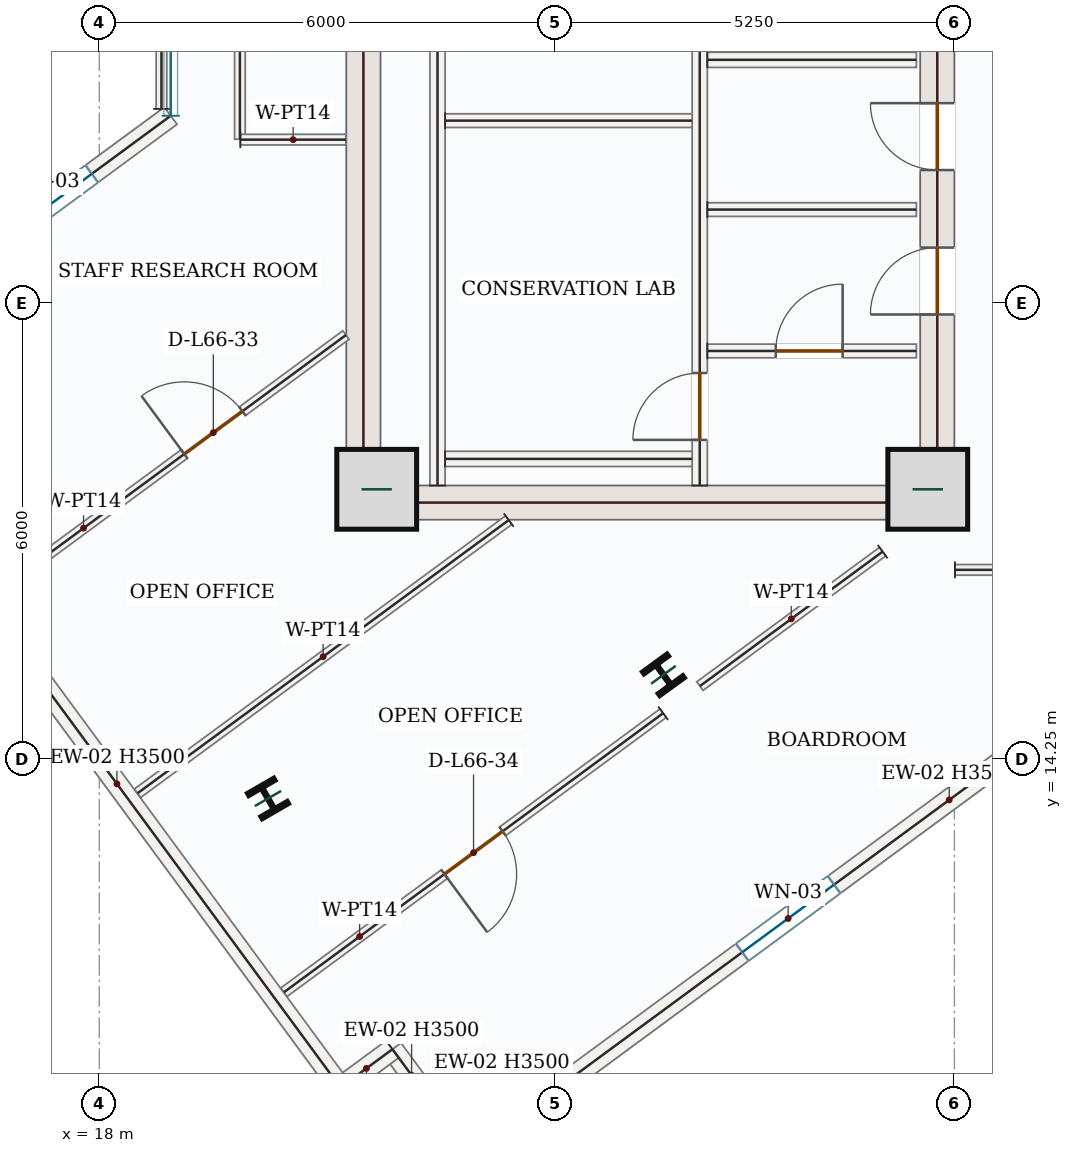
"""IFC4 building model, lengths in metres.
Left out: names, types, materials, properties, quantities, classifications, styles, units other than length and angle.
Written with IfcOpenShell. Run it as: python <this file> out.ifc"""

import sys

from ifc_helpers import new_model, si_unit, direction, frame, frame_2d, origin, origin_2d, place, context, subcontext, project, spatial, rectangle, i_section, extrude, source, transform, mapped, element, fill, save


model = new_model("IFC4")
c1 = context("Model", 3, precision=1e-05, world=origin(), true_north=direction((0.0, 1.0)))
c2 = subcontext(c1, "Body", "Model", "MODEL_VIEW")
j1 = project(units=[si_unit("LENGTHUNIT", "METRE"), si_unit("PLANEANGLEUNIT", "RADIAN")], contexts=[c1])
p1 = place(None, origin())
s1 = spatial("IfcSite", under=j1, at=p1, CompositionType="ELEMENT")
p2 = place(p1, origin())
s2 = spatial("IfcBuilding", under=s1, at=p2, CompositionType="ELEMENT")
p3 = place(p2, frame((0.0, 0.0, 276.6)))
s3 = spatial("IfcBuildingStorey", under=s2, at=p3, CompositionType="ELEMENT", Elevation=276.6)
m1 = source(origin(), c2, "Body", "SweptSolid", [
    extrude(rectangle(XDim=8.55, YDim=0.45, at=frame_2d((4.275, 0.0))), origin(), (0.0, 0.0, 1.0), 3.5),
])
p4 = place(p3, frame((21.475, 17.4, 0.0), z_axis=(0.0, 0.0, 1.0), x_axis=(0.0, 1.0, 0.0)))
e1 = element("IfcWall", 1, at=p4, inside=s3, PredefinedType="SHEAR", context=c2, shape_type="MappedRepresentation", body=[
    mapped(m1, transform((0.0, 0.0, 0.0), x_axis=(1.0, 0.0, 0.0), y_axis=(0.0, 1.0, 0.0), z_axis=(0.0, 0.0, 1.0), scale=1.0)),
])
p5 = place(p3, frame((29.025, 17.4, 0.0), z_axis=(0.0, 0.0, 1.0), x_axis=(0.0, 1.0, 0.0)))
e2 = element("IfcWall", 2, at=p5, inside=s3, PredefinedType="SHEAR", context=c2, shape_type="SweptSolid", body=[
    extrude(rectangle(XDim=8.55, YDim=0.45, at=frame_2d((4.275, 0.0))), origin(), (0.0, 0.0, 1.0), 3.5),
])
p6 = place(p5, frame((6.65, 0.0, 0.0)))
e3 = element("IfcOpeningElement", 3, at=p6, cuts=e2, PredefinedType="OPENING", context=c2, shape_type="SweptSolid", body=[
    extrude(rectangle(XDim=1.1, YDim=2.2, at=frame_2d((0.55, 1.1))), frame((0.0, 0.235, 0.0), z_axis=(0.0, -1.0, 0.0), x_axis=(1.0, 0.0, 0.0)), (0.0, 0.0, 1.0), 0.47),
])
p7 = place(p5, frame((2.7, 0.0, 0.0)))
e4 = element("IfcOpeningElement", 4, at=p7, cuts=e2, PredefinedType="OPENING", context=c2, shape_type="SweptSolid", body=[
    extrude(rectangle(XDim=0.88, YDim=2.1, at=frame_2d((0.44, 1.05))), frame((0.0, 0.235, 0.0), z_axis=(0.0, -1.0, 0.0), x_axis=(1.0, 0.0, 0.0)), (0.0, 0.0, 1.0), 0.47),
])
p8 = place(p5, frame((4.6, 0.0, 0.0)))
e5 = element("IfcOpeningElement", 5, at=p8, cuts=e2, PredefinedType="OPENING", context=c2, shape_type="SweptSolid", body=[
    extrude(rectangle(XDim=0.88, YDim=2.1, at=frame_2d((0.44, 1.05))), frame((0.0, 0.235, 0.0), z_axis=(0.0, -1.0, 0.0), x_axis=(1.0, 0.0, 0.0)), (0.0, 0.0, 1.0), 0.47),
])
m2 = source(origin(), c2, "Body", "SweptSolid", [
    extrude(rectangle(XDim=7.1, YDim=0.45, at=frame_2d((3.55, 0.0))), origin(), (0.0, 0.0, 1.0), 3.5),
])
p9 = place(p3, frame((21.7, 17.625, 0.0), z_axis=(0.0, 0.0, 1.0), x_axis=(1.0, 0.0, 0.0)))
e6 = element("IfcWall", 6, at=p9, inside=s3, PredefinedType="SHEAR", context=c2, shape_type="MappedRepresentation", body=[
    mapped(m2, transform((0.0, 0.0, 0.0), x_axis=(1.0, 0.0, 0.0), y_axis=(0.0, 1.0, 0.0), z_axis=(0.0, 0.0, 1.0), scale=1.0)),
])
m3 = source(origin(), c2, "Body", "SweptSolid", [
    extrude(rectangle(XDim=1.05, YDim=1.05, at=origin_2d()), origin(), (0.0, 0.0, 1.0), 3.75),
])
for number, where, z_axis, x_axis in (
    (7, (21.65, 17.8, 0.0), (0.0, 0.0, 1.0), (1.0, 0.0, 0.0)),
    (8, (28.9, 17.8, 0.0), (0.0, 0.0, 1.0), (1.0, 0.0, 0.0)),
):
    element("IfcColumn", number, at=place(p3, frame(where, z_axis=z_axis, x_axis=x_axis)), inside=s3, PredefinedType="COLUMN", context=c2, shape_type="MappedRepresentation", body=[
        mapped(m3, transform((0.0, 0.0, 0.0), x_axis=(1.0, 0.0, 0.0), y_axis=(0.0, 1.0, 0.0), z_axis=(0.0, 0.0, 1.0), scale=1.0)),
    ])
m4 = source(origin(), c2, "Body", "SweptSolid", [
    extrude(i_section(OverallWidth=0.399, OverallDepth=0.386, WebThickness=0.021, FlangeThickness=0.033, FilletRadius=0.018, at=origin_2d()), origin(), (0.0, 0.0, 1.0), 3.75),
])
for number, where, z_axis, x_axis in (
    (9, (25.422, 15.359, 0.0), (0.0, 0.0, 1.0), (0.809, 0.588, 0.0)),
    (10, (20.22, 13.732, 0.0), (0.0, 0.0, 1.0), (0.866, 0.5, 0.0)),
):
    element("IfcColumn", number, at=place(p3, frame(where, z_axis=z_axis, x_axis=x_axis)), inside=s3, PredefinedType="COLUMN", context=c2, shape_type="MappedRepresentation", body=[
        mapped(m4, transform((0.0, 0.0, 0.0), x_axis=(1.0, 0.0, 0.0), y_axis=(0.0, 1.0, 0.0), z_axis=(0.0, 0.0, 1.0), scale=1.0)),
    ])
p10 = place(p3, frame((30.577, 14.74, 0.0), z_axis=(0.0, 0.0, 1.0), x_axis=(-0.805403112922, -0.592727446383, 0.0)))
e11 = element("IfcWall", 11, at=p10, inside=s3, PredefinedType="SOLIDWALL", context=c2, shape_type="SweptSolid", body=[
    extrude(rectangle(XDim=8.726, YDim=0.28, at=frame_2d((4.363, 0.0))), origin(), (0.0, 0.0, 1.0), 3.5),
])
p11 = place(p10, frame((3.613, 0.0, 0.85)))
e12 = element("IfcOpeningElement", 12, at=p11, cuts=e11, PredefinedType="OPENING", context=c2, shape_type="SweptSolid", body=[
    extrude(rectangle(XDim=1.5, YDim=1.5, at=frame_2d((0.75, 0.75))), frame((0.0, 0.15, 0.0), z_axis=(0.0, -1.0, 0.0), x_axis=(1.0, 0.0, 0.0)), (0.0, 0.0, 1.0), 0.3),
])
m5 = source(origin(), c2, "Body", "SweptSolid", [
    extrude(rectangle(XDim=0.85, YDim=0.28, at=frame_2d((0.425, 0.0))), origin(), (0.0, 0.0, 1.0), 3.5),
])
p12 = place(p3, frame((23.549, 9.568, 0.0), z_axis=(0.0, 0.0, 1.0), x_axis=(-0.592807079659, 0.80534450163, 0.0)))
e13 = element("IfcWall", 13, at=p12, inside=s3, PredefinedType="SOLIDWALL", context=c2, shape_type="MappedRepresentation", body=[
    mapped(m5, transform((0.0, 0.0, 0.0), x_axis=(1.0, 0.0, 0.0), y_axis=(0.0, 1.0, 0.0), z_axis=(0.0, 0.0, 1.0), scale=1.0)),
])
m6 = source(origin(), c2, "Body", "SweptSolid", [
    extrude(rectangle(XDim=0.85, YDim=0.28, at=frame_2d((0.425, 0.0))), origin(), (0.0, 0.0, 1.0), 3.5),
])
for number, where, z_axis, x_axis in (
    (14, (23.045, 10.253, 0.0), (0.0, 0.0, 1.0), (-0.805, -0.593, 0.0)),
    (15, (22.361, 9.749, 0.0), (0.0, 0.0, 1.0), (-0.593, 0.805, 0.0)),
):
    element("IfcWall", number, at=place(p3, frame(where, z_axis=z_axis, x_axis=x_axis)), inside=s3, PredefinedType="SOLIDWALL", context=c2, shape_type="MappedRepresentation", body=[
        mapped(m6, transform((0.0, 0.0, 0.0), x_axis=(1.0, 0.0, 0.0), y_axis=(0.0, 1.0, 0.0), z_axis=(0.0, 0.0, 1.0), scale=1.0)),
    ])
p13 = place(p3, frame((21.857, 10.434, 0.0), z_axis=(0.0, 0.0, 1.0), x_axis=(-0.80534450163, -0.592807079659, 0.0)))
e16 = element("IfcWall", 16, at=p13, inside=s3, PredefinedType="SOLIDWALL", context=c2, shape_type="MappedRepresentation", body=[
    mapped(m5, transform((0.0, 0.0, 0.0), x_axis=(1.0, 0.0, 0.0), y_axis=(0.0, 1.0, 0.0), z_axis=(0.0, 0.0, 1.0), scale=1.0)),
])
m7 = source(origin(), c2, "Body", "SweptSolid", [
    extrude(rectangle(XDim=9.92, YDim=0.28, at=frame_2d((4.96, 0.0))), origin(), (0.0, 0.0, 1.0), 3.5),
])
p14 = place(p3, frame((21.173, 9.93, 0.0), z_axis=(0.0, 0.0, 1.0), x_axis=(-0.592722097771, 0.805407049146, 0.0)))
e17 = element("IfcWall", 17, at=p14, inside=s3, PredefinedType="SOLIDWALL", context=c2, shape_type="MappedRepresentation", body=[
    mapped(m7, transform((0.0, 0.0, 0.0), x_axis=(1.0, 0.0, 0.0), y_axis=(0.0, 1.0, 0.0), z_axis=(0.0, 0.0, 1.0), scale=1.0)),
])
p15 = place(p3, frame((15.654, 20.296, 0.0), z_axis=(0.0, 0.0, 1.0), x_axis=(0.805410687764, 0.592717153486, 0.0)))
e18 = element("IfcWall", 18, at=p15, inside=s3, PredefinedType="SOLIDWALL", context=c2, shape_type="SweptSolid", body=[
    extrude(rectangle(XDim=4.079, YDim=0.28, at=frame_2d((2.04, 0.0))), origin(), (0.0, 0.0, 1.0), 3.5),
])
p16 = place(p15, frame((1.29, 0.0, 0.85)))
e19 = element("IfcOpeningElement", 19, at=p16, cuts=e18, PredefinedType="OPENING", context=c2, shape_type="SweptSolid", body=[
    extrude(rectangle(XDim=1.5, YDim=1.5, at=frame_2d((0.75, 0.75))), frame((0.0, 0.15, 0.0), z_axis=(0.0, -1.0, 0.0), x_axis=(1.0, 0.0, 0.0)), (0.0, 0.0, 1.0), 0.3),
])
m8 = source(origin(), c2, "Body", "SweptSolid", [
    extrude(rectangle(XDim=7.87, YDim=0.2, at=frame_2d((3.935, 0.0))), origin(), (0.0, 0.0, 1.0), 3.5),
])
p17 = place(p3, frame((22.45, 17.85, 0.0), z_axis=(0.0, 0.0, 1.0), x_axis=(0.0, 1.0, 0.0)))
e20 = element("IfcWall", 20, at=p17, inside=s3, PredefinedType="SOLIDWALL", context=c2, shape_type="MappedRepresentation", body=[
    mapped(m8, transform((0.0, 0.0, 0.0), x_axis=(1.0, 0.0, 0.0), y_axis=(0.0, 1.0, 0.0), z_axis=(0.0, 0.0, 1.0), scale=1.0)),
])
p18 = place(p3, frame((25.9, 17.85, 0.0), z_axis=(0.0, 0.0, 1.0), x_axis=(0.0, 1.0, 0.0)))
e21 = element("IfcWall", 21, at=p18, inside=s3, PredefinedType="SOLIDWALL", context=c2, shape_type="SweptSolid", body=[
    extrude(rectangle(XDim=8.0, YDim=0.2, at=frame_2d((4.0, 0.0))), origin(), (0.0, 0.0, 1.0), 3.5),
])
p19 = place(p18, frame((6.2, 0.0, 0.0)))
e22 = element("IfcOpeningElement", 22, at=p19, cuts=e21, PredefinedType="OPENING", context=c2, shape_type="SweptSolid", body=[
    extrude(rectangle(XDim=1.0, YDim=2.15, at=frame_2d((0.5, 1.075))), frame((0.0, 0.11, 0.0), z_axis=(0.0, -1.0, 0.0), x_axis=(1.0, 0.0, 0.0)), (0.0, 0.0, 1.0), 0.22),
])
p20 = place(p18, frame((0.6, 0.0, 0.0)))
e23 = element("IfcOpeningElement", 23, at=p20, cuts=e21, PredefinedType="OPENING", context=c2, shape_type="SweptSolid", body=[
    extrude(rectangle(XDim=0.88, YDim=2.1, at=frame_2d((0.44, 1.05))), frame((0.0, 0.11, 0.0), z_axis=(0.0, -1.0, 0.0), x_axis=(1.0, 0.0, 0.0)), (0.0, 0.0, 1.0), 0.22),
])
m9 = source(origin(), c2, "Body", "SweptSolid", [
    extrude(rectangle(XDim=3.25, YDim=0.2, at=frame_2d((1.625, 0.0))), origin(), (0.0, 0.0, 1.0), 3.5),
])
p21 = place(p3, frame((22.55, 18.2, 0.0), z_axis=(0.0, 0.0, 1.0), x_axis=(1.0, 0.0, 0.0)))
e24 = element("IfcWall", 24, at=p21, inside=s3, PredefinedType="SOLIDWALL", context=c2, shape_type="MappedRepresentation", body=[
    mapped(m9, transform((0.0, 0.0, 0.0), x_axis=(1.0, 0.0, 0.0), y_axis=(0.0, 1.0, 0.0), z_axis=(0.0, 0.0, 1.0), scale=1.0)),
])
m10 = source(origin(), c2, "Body", "SweptSolid", [
    extrude(rectangle(XDim=3.25, YDim=0.18, at=frame_2d((1.625, 0.0))), origin(), (0.0, 0.0, 1.0), 3.5),
])
p22 = place(p3, frame((22.55, 22.65, 0.0), z_axis=(0.0, 0.0, 1.0), x_axis=(1.0, 0.0, 0.0)))
e25 = element("IfcWall", 25, at=p22, inside=s3, PredefinedType="PARTITIONING", context=c2, shape_type="MappedRepresentation", body=[
    mapped(m10, transform((0.0, 0.0, 0.0), x_axis=(1.0, 0.0, 0.0), y_axis=(0.0, 1.0, 0.0), z_axis=(0.0, 0.0, 1.0), scale=1.0)),
])
m11 = source(origin(), c2, "Body", "SweptSolid", [
    extrude(rectangle(XDim=2.75, YDim=0.2, at=frame_2d((1.375, 0.0))), origin(), (0.0, 0.0, 1.0), 3.5),
])
p23 = place(p3, frame((26.0, 23.45, 0.0), z_axis=(0.0, 0.0, 1.0), x_axis=(1.0, 0.0, 0.0)))
e26 = element("IfcWall", 26, at=p23, inside=s3, PredefinedType="SOLIDWALL", context=c2, shape_type="MappedRepresentation", body=[
    mapped(m11, transform((0.0, 0.0, 0.0), x_axis=(1.0, 0.0, 0.0), y_axis=(0.0, 1.0, 0.0), z_axis=(0.0, 0.0, 1.0), scale=1.0)),
])
p24 = place(p3, frame((26.0, 19.62, 0.0), z_axis=(0.0, 0.0, 1.0), x_axis=(1.0, 0.0, 0.0)))
e27 = element("IfcWall", 27, at=p24, inside=s3, PredefinedType="PARTITIONING", context=c2, shape_type="SweptSolid", body=[
    extrude(rectangle(XDim=2.75, YDim=0.18, at=frame_2d((1.375, 0.0))), origin(), (0.0, 0.0, 1.0), 3.5),
])
p25 = place(p24, frame((0.9, 0.0, 0.0)))
e28 = element("IfcOpeningElement", 28, at=p25, cuts=e27, PredefinedType="OPENING", context=c2, shape_type="SweptSolid", body=[
    extrude(rectangle(XDim=0.88, YDim=2.1, at=frame_2d((0.44, 1.05))), frame((0.0, 0.1, 0.0), z_axis=(0.0, -1.0, 0.0), x_axis=(1.0, 0.0, 0.0)), (0.0, 0.0, 1.0), 0.2),
])
m12 = source(origin(), c2, "Body", "SweptSolid", [
    extrude(rectangle(XDim=2.75, YDim=0.18, at=frame_2d((1.375, 0.0))), origin(), (0.0, 0.0, 1.0), 3.5),
])
p26 = place(p3, frame((26.0, 21.48, 0.0), z_axis=(0.0, 0.0, 1.0), x_axis=(1.0, 0.0, 0.0)))
e29 = element("IfcWall", 29, at=p26, inside=s3, PredefinedType="PARTITIONING", context=c2, shape_type="MappedRepresentation", body=[
    mapped(m12, transform((0.0, 0.0, 0.0), x_axis=(1.0, 0.0, 0.0), y_axis=(0.0, 1.0, 0.0), z_axis=(0.0, 0.0, 1.0), scale=1.0)),
])
m13 = source(origin(), c2, "Body", "SweptSolid", [
    extrude(rectangle(XDim=6.063, YDim=0.14, at=frame_2d((3.032, 0.0))), origin(), (0.0, 0.0, 1.0), 3.5),
])
p27 = place(p3, frame((23.387, 17.395, 0.0), z_axis=(0.0, 0.0, 1.0), x_axis=(-0.805422045282, -0.59270172007, 0.0)))
e30 = element("IfcWall", 30, at=p27, inside=s3, PredefinedType="PARTITIONING", context=c2, shape_type="MappedRepresentation", body=[
    mapped(m13, transform((0.0, 0.0, 0.0), x_axis=(1.0, 0.0, 0.0), y_axis=(0.0, 1.0, 0.0), z_axis=(0.0, 0.0, 1.0), scale=1.0)),
])
p28 = place(p3, frame((16.589, 16.403, 0.0), z_axis=(0.0, 0.0, 1.0), x_axis=(0.80540492624, 0.592724982423, 0.0)))
e31 = element("IfcWall", 31, at=p28, inside=s3, PredefinedType="PARTITIONING", context=c2, shape_type="SweptSolid", body=[
    extrude(rectangle(XDim=5.781, YDim=0.14, at=frame_2d((2.891, 0.0))), origin(), (0.0, 0.0, 1.0), 3.5),
])
p29 = place(p28, frame((3.14, 0.0, 0.0)))
e32 = element("IfcOpeningElement", 32, at=p29, cuts=e31, PredefinedType="OPENING", context=c2, shape_type="SweptSolid", body=[
    extrude(rectangle(XDim=0.95, YDim=2.15, at=frame_2d((0.475, 1.075))), frame((0.0, 0.08, 0.0), z_axis=(0.0, -1.0, 0.0), x_axis=(1.0, 0.0, 0.0)), (0.0, 0.0, 1.0), 0.16),
])
m14 = source(origin(), c2, "Body", "SweptSolid", [
    extrude(rectangle(XDim=2.985, YDim=0.14, at=frame_2d((1.492, 0.0))), origin(), (0.0, 0.0, 1.0), 3.5),
])
p30 = place(p3, frame((28.306, 16.98, 0.0), z_axis=(0.0, 0.0, 1.0), x_axis=(-0.80539491033, -0.592738591973, 0.0)))
e33 = element("IfcWall", 33, at=p30, inside=s3, PredefinedType="PARTITIONING", context=c2, shape_type="MappedRepresentation", body=[
    mapped(m14, transform((0.0, 0.0, 0.0), x_axis=(1.0, 0.0, 0.0), y_axis=(0.0, 1.0, 0.0), z_axis=(0.0, 0.0, 1.0), scale=1.0)),
])
p31 = place(p3, frame((25.418, 14.854, 0.0), z_axis=(0.0, 0.0, 1.0), x_axis=(-0.805402487917, -0.592728295645, 0.0)))
e34 = element("IfcWall", 34, at=p31, inside=s3, PredefinedType="PARTITIONING", context=c2, shape_type="SweptSolid", body=[
    extrude(rectangle(XDim=6.193, YDim=0.14, at=frame_2d((3.097, 0.0))), origin(), (0.0, 0.0, 1.0), 3.5),
])
p32 = place(p31, frame((2.622, 0.0, 0.0)))
e35 = element("IfcOpeningElement", 35, at=p32, cuts=e34, PredefinedType="OPENING", context=c2, shape_type="SweptSolid", body=[
    extrude(rectangle(XDim=0.95, YDim=2.15, at=frame_2d((0.475, 1.075))), frame((0.0, 0.08, 0.0), z_axis=(0.0, -1.0, 0.0), x_axis=(1.0, 0.0, 0.0)), (0.0, 0.0, 1.0), 0.16),
])
p33 = place(p3, frame((19.85, 29.49, 0.0), z_axis=(0.0, 0.0, 1.0), x_axis=(0.0, -1.0, 0.0)))
e36 = element("IfcWall", 36, at=p33, inside=s3, PredefinedType="PARTITIONING", context=c2, shape_type="SweptSolid", body=[
    extrude(rectangle(XDim=7.083, YDim=0.14, at=frame_2d((3.542, 0.0))), origin(), (0.0, 0.0, 1.0), 3.5),
])
p34 = place(p33, frame((1.349, 0.0, 0.0)))
e37 = element("IfcOpeningElement", 37, at=p34, cuts=e36, PredefinedType="OPENING", context=c2, shape_type="SweptSolid", body=[
    extrude(rectangle(XDim=0.95, YDim=2.15, at=frame_2d((0.475, 1.075))), frame((0.0, 0.08, 0.0), z_axis=(0.0, -1.0, 0.0), x_axis=(1.0, 0.0, 0.0)), (0.0, 0.0, 1.0), 0.16),
])
m15 = source(origin(), c2, "Body", "SweptSolid", [
    extrude(rectangle(XDim=1.389, YDim=0.14, at=frame_2d((0.695, 0.0))), origin(), (0.0, 0.0, 1.0), 3.5),
])
p35 = place(p3, frame((19.856, 22.4, 0.0), z_axis=(0.0, 0.0, 1.0), x_axis=(1.0, 0.0, 0.0)))
e38 = element("IfcWall", 38, at=p35, inside=s3, PredefinedType="PARTITIONING", context=c2, shape_type="MappedRepresentation", body=[
    mapped(m15, transform((0.0, 0.0, 0.0), x_axis=(1.0, 0.0, 0.0), y_axis=(0.0, 1.0, 0.0), z_axis=(0.0, 0.0, 1.0), scale=1.0)),
])
m16 = source(origin(), c2, "Body", "SweptSolid", [
    extrude(rectangle(XDim=6.836, YDim=0.14, at=frame_2d((3.418, 0.0))), origin(), (0.0, 0.0, 1.0), 3.5),
])
p36 = place(p3, frame((18.818, 22.805, 0.0), z_axis=(0.0, 0.0, 1.0), x_axis=(0.000285724478, 0.999999959181, 0.0)))
e39 = element("IfcWall", 39, at=p36, inside=s3, PredefinedType="PARTITIONING", context=c2, shape_type="MappedRepresentation", body=[
    mapped(m16, transform((0.0, 0.0, 0.0), x_axis=(1.0, 0.0, 0.0), y_axis=(0.0, 1.0, 0.0), z_axis=(0.0, 0.0, 1.0), scale=1.0)),
])
p37 = place(p3, frame((29.258, 16.74, 0.0), z_axis=(0.0, 0.0, 1.0), x_axis=(0.999999998895, -4.7021207e-05, 0.0)))
e40 = element("IfcWall", 40, at=p37, inside=s3, PredefinedType="PARTITIONING", context=c2, shape_type="SweptSolid", body=[
    extrude(rectangle(XDim=5.192, YDim=0.14, at=frame_2d((2.596, 0.0))), origin(), (0.0, 0.0, 1.0), 3.5),
])
p38 = place(p37, frame((3.309, 0.0, 0.0)))
e41 = element("IfcOpeningElement", 41, at=p38, cuts=e40, PredefinedType="OPENING", context=c2, shape_type="SweptSolid", body=[
    extrude(rectangle(XDim=0.95, YDim=2.15, at=frame_2d((0.475, 1.075))), frame((0.0, 0.08, 0.0), z_axis=(0.0, -1.0, 0.0), x_axis=(1.0, 0.0, 0.0)), (0.0, 0.0, 1.0), 0.16),
])
m17 = source(origin(), c2, "Body", "SweptSolid", [
    extrude(rectangle(XDim=1.5, YDim=1.5, at=frame_2d((0.75, 0.75))), frame((0.0, 0.03, 0.0), z_axis=(0.0, -1.0, 0.0), x_axis=(1.0, 0.0, 0.0)), (0.0, 0.0, 1.0), 0.06),
])
p39 = place(p11, origin())
e42 = element("IfcWindow", 42, at=p39, inside=s3, PartitioningType="SINGLE_PANEL", PredefinedType="WINDOW", context=c2, shape_type="MappedRepresentation", body=[
    mapped(m17, transform((0.0, 0.0, 0.0), x_axis=(1.0, 0.0, 0.0), y_axis=(0.0, 1.0, 0.0), z_axis=(0.0, 0.0, 1.0), scale=1.0)),
])
fill(e12, e42)
p40 = place(p16, origin())
e43 = element("IfcWindow", 43, at=p40, inside=s3, PartitioningType="SINGLE_PANEL", PredefinedType="WINDOW", context=c2, shape_type="MappedRepresentation", body=[
    mapped(m17, transform((0.0, 0.0, 0.0), x_axis=(1.0, 0.0, 0.0), y_axis=(0.0, 1.0, 0.0), z_axis=(0.0, 0.0, 1.0), scale=1.0)),
])
fill(e19, e43)
m18 = source(origin(), c2, "Body", "SweptSolid", [
    extrude(rectangle(XDim=0.88, YDim=2.1, at=frame_2d((0.44, 1.05))), frame((0.0, 0.025, 0.0), z_axis=(0.0, -1.0, 0.0), x_axis=(1.0, 0.0, 0.0)), (0.0, 0.0, 1.0), 0.05),
])
p41 = place(p20, origin())
e44 = element("IfcDoor", 44, at=p41, inside=s3, OperationType="SINGLE_SWING_LEFT", PredefinedType="DOOR", context=c2, shape_type="MappedRepresentation", body=[
    mapped(m18, transform((0.0, 0.0, 0.0), x_axis=(1.0, 0.0, 0.0), y_axis=(0.0, 1.0, 0.0), z_axis=(0.0, 0.0, 1.0), scale=1.0)),
])
fill(e23, e44)
p42 = place(p25, origin())
e45 = element("IfcDoor", 45, at=p42, inside=s3, OperationType="SINGLE_SWING_RIGHT", PredefinedType="DOOR", context=c2, shape_type="MappedRepresentation", body=[
    mapped(m18, transform((0.0, 0.0, 0.0), x_axis=(1.0, 0.0, 0.0), y_axis=(0.0, 1.0, 0.0), z_axis=(0.0, 0.0, 1.0), scale=1.0)),
])
fill(e28, e45)
p43 = place(p7, origin())
e46 = element("IfcDoor", 46, at=p43, inside=s3, OperationType="SINGLE_SWING_LEFT", PredefinedType="DOOR", context=c2, shape_type="MappedRepresentation", body=[
    mapped(m18, transform((0.0, 0.0, 0.0), x_axis=(1.0, 0.0, 0.0), y_axis=(0.0, 1.0, 0.0), z_axis=(0.0, 0.0, 1.0), scale=1.0)),
])
fill(e4, e46)
p44 = place(p8, origin())
e47 = element("IfcDoor", 47, at=p44, inside=s3, OperationType="SINGLE_SWING_RIGHT", PredefinedType="DOOR", context=c2, shape_type="MappedRepresentation", body=[
    mapped(m18, transform((0.0, 0.0, 0.0), x_axis=(1.0, 0.0, 0.0), y_axis=(0.0, 1.0, 0.0), z_axis=(0.0, 0.0, 1.0), scale=1.0)),
])
fill(e5, e47)
m19 = source(origin(), c2, "Body", "SweptSolid", [
    extrude(rectangle(XDim=0.95, YDim=2.15, at=frame_2d((0.475, 1.075))), frame((0.0, 0.025, 0.0), z_axis=(0.0, -1.0, 0.0), x_axis=(1.0, 0.0, 0.0)), (0.0, 0.0, 1.0), 0.05),
])
p45 = place(p29, origin())
e48 = element("IfcDoor", 48, at=p45, inside=s3, OperationType="SINGLE_SWING_LEFT", PredefinedType="DOOR", context=c2, shape_type="MappedRepresentation", body=[
    mapped(m19, transform((0.0, 0.0, 0.0), x_axis=(1.0, 0.0, 0.0), y_axis=(0.0, 1.0, 0.0), z_axis=(0.0, 0.0, 1.0), scale=1.0)),
])
fill(e32, e48)
p46 = place(p32, origin())
e49 = element("IfcDoor", 49, at=p46, inside=s3, OperationType="SINGLE_SWING_RIGHT", PredefinedType="DOOR", context=c2, shape_type="MappedRepresentation", body=[
    mapped(m19, transform((0.0, 0.0, 0.0), x_axis=(1.0, 0.0, 0.0), y_axis=(0.0, 1.0, 0.0), z_axis=(0.0, 0.0, 1.0), scale=1.0)),
])
fill(e35, e49)
save(model, sys.argv[1])
